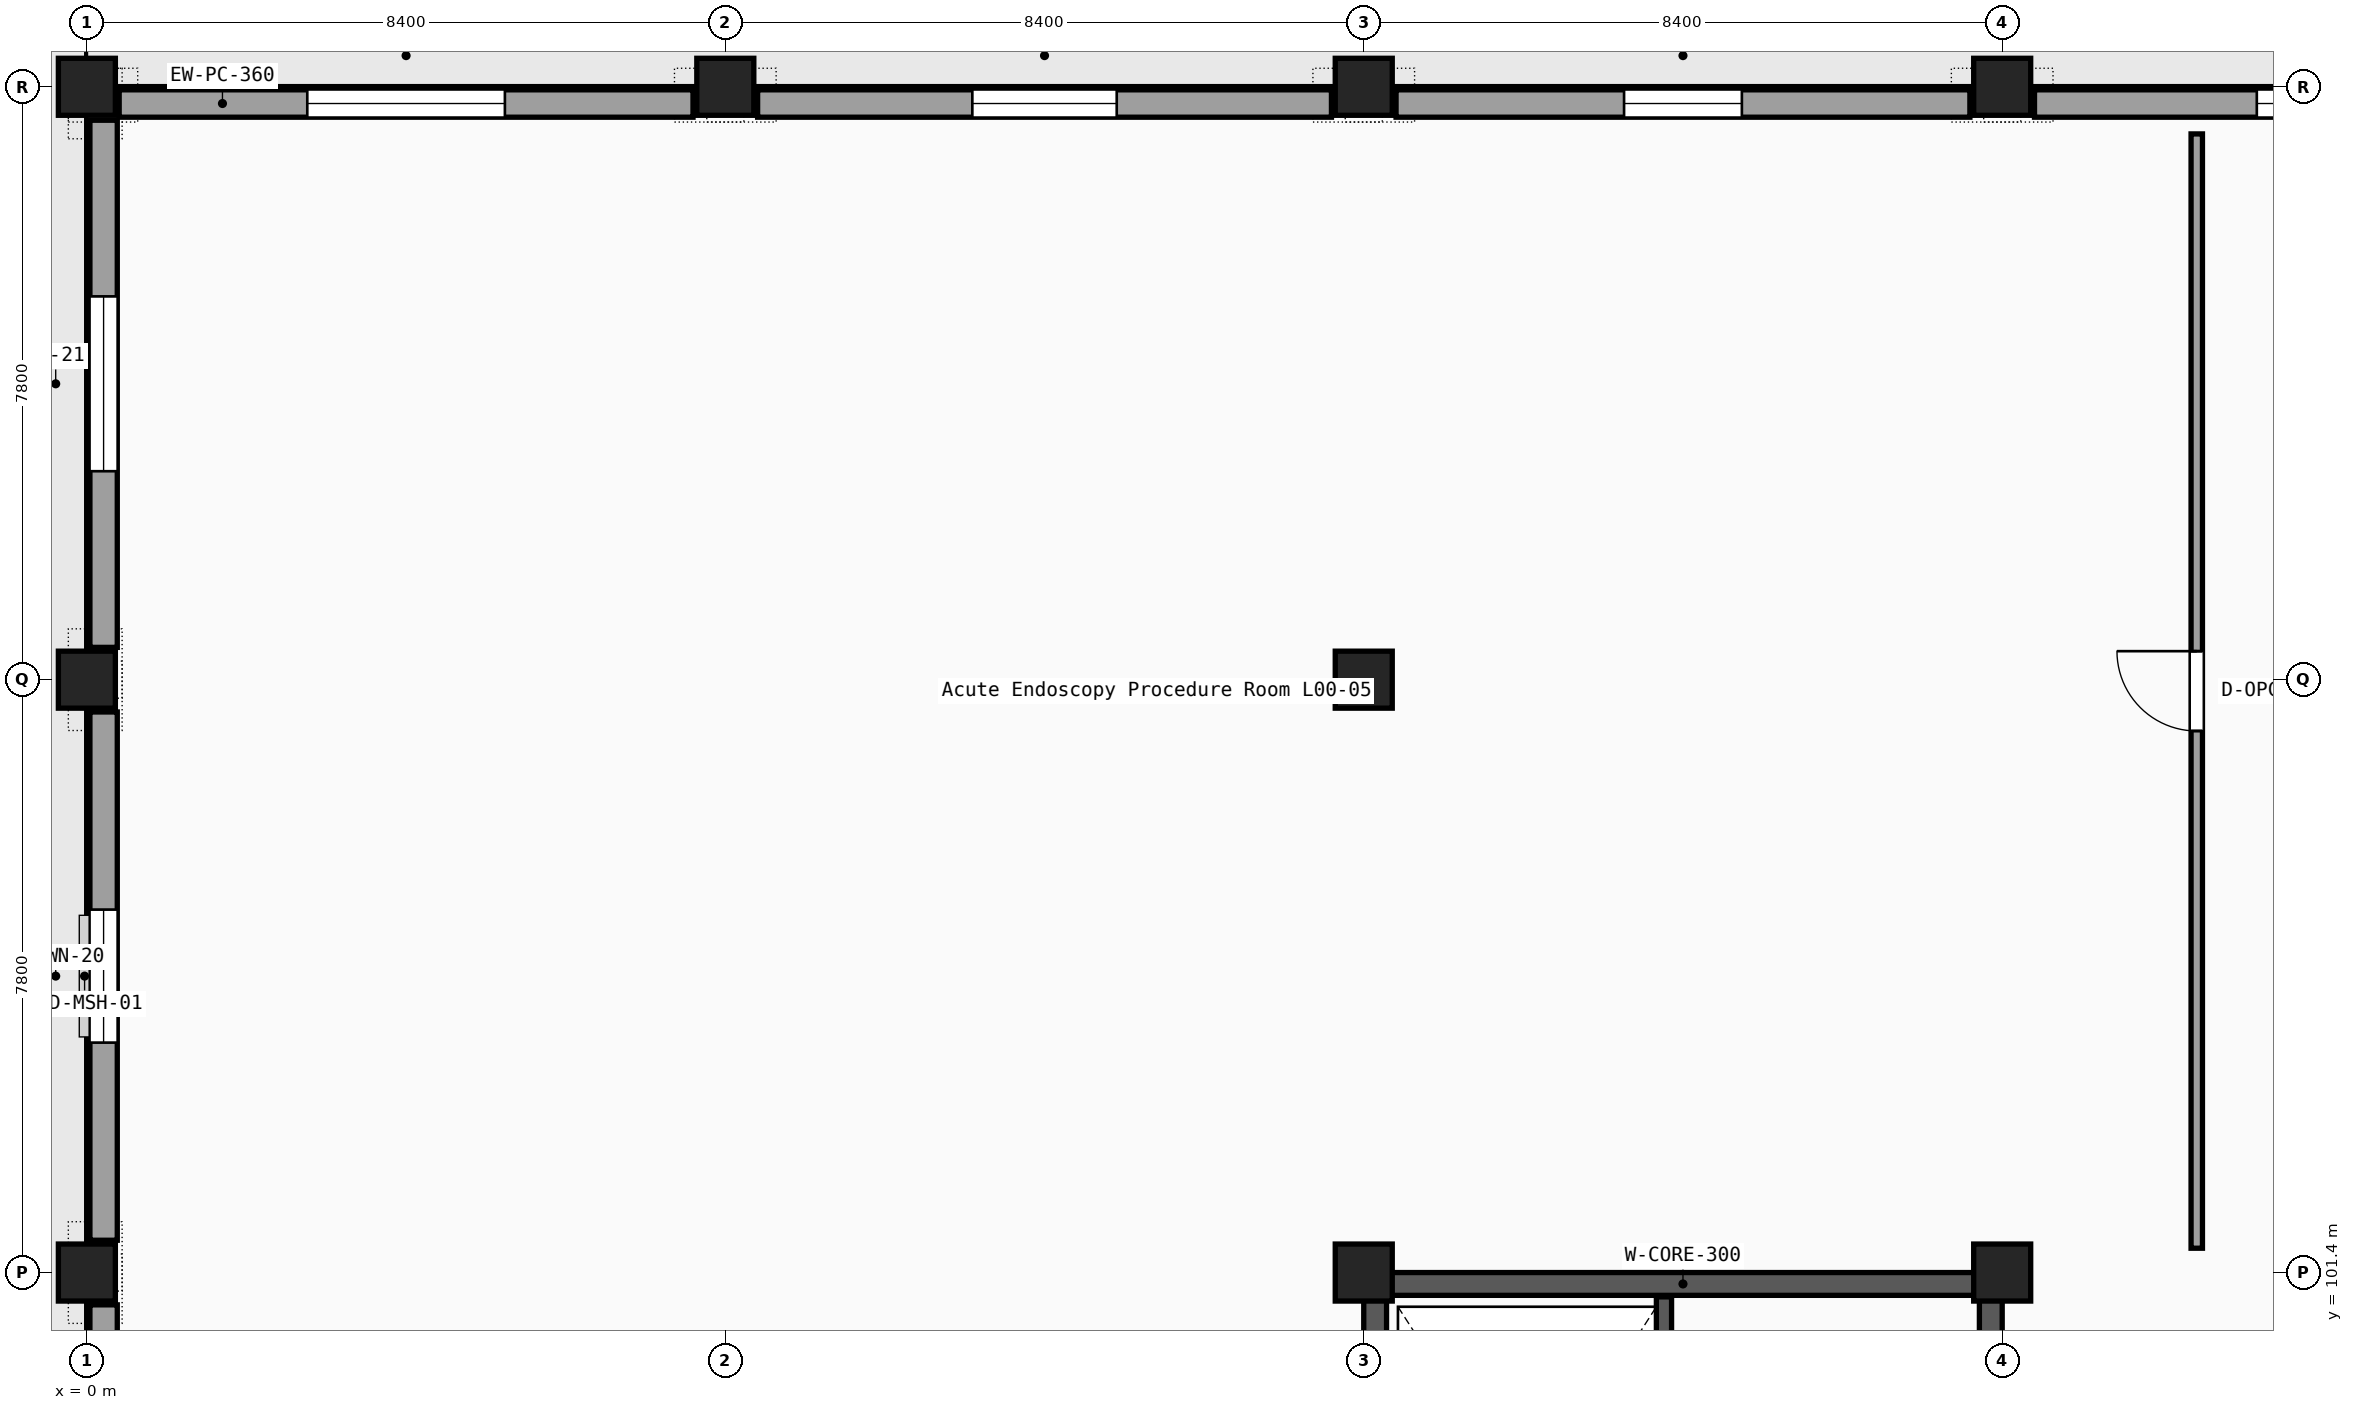
"""IFC4 building model, lengths in metres.
Left out: names, types, materials, properties, quantities, classifications, styles, units other than length and angle.
Written with IfcOpenShell. Run it as: python <this file> out.ifc"""

import sys

from ifc_helpers import new_model, si_unit, direction, frame, frame_2d, origin, origin_2d, place, context, subcontext, project, spatial, rectangle, extrude, element, fill, save


model = new_model("IFC4")
c1 = context("Model", 3, precision=1e-05, world=origin(), true_north=direction((0.0, 1.0)))
c2 = subcontext(c1, "Body", "Model", "MODEL_VIEW")
j1 = project(units=[si_unit("LENGTHUNIT", "METRE"), si_unit("PLANEANGLEUNIT", "RADIAN")], contexts=[c1])
p1 = place(None, origin())
s1 = spatial("IfcSite", under=j1, at=p1, CompositionType="ELEMENT")
p2 = place(p1, origin())
s2 = spatial("IfcBuilding", under=s1, at=p2, CompositionType="ELEMENT")
p3 = place(p2, origin())
s3 = spatial("IfcBuildingStorey", under=s2, at=p3, CompositionType="ELEMENT", Elevation=0.0)
for number, where, z_axis, x_axis in (
    (1, (0.0, 101.4, 0.0), (0.0, 0.0, 1.0), (1.0, 0.0, 0.0)),
    (2, (0.0, 109.2, 0.0), (0.0, 0.0, 1.0), (1.0, 0.0, 0.0)),
    (3, (0.0, 117.0, 0.0), (0.0, 0.0, 1.0), (1.0, 0.0, 0.0)),
    (4, (8.4, 117.0, 0.0), (0.0, 0.0, 1.0), (1.0, 0.0, 0.0)),
    (5, (16.8, 101.4, 0.0), (0.0, 0.0, 1.0), (1.0, 0.0, 0.0)),
    (6, (16.8, 109.2, 0.0), (0.0, 0.0, 1.0), (1.0, 0.0, 0.0)),
    (7, (16.8, 117.0, 0.0), (0.0, 0.0, 1.0), (1.0, 0.0, 0.0)),
    (8, (25.2, 101.4, 0.0), (0.0, 0.0, 1.0), (1.0, 0.0, 0.0)),
    (9, (25.2, 117.0, 0.0), (0.0, 0.0, 1.0), (1.0, 0.0, 0.0)),
):
    element("IfcColumn", number, at=place(p3, frame(where, z_axis=z_axis, x_axis=x_axis)), inside=s3, PredefinedType="COLUMN", context=c2, shape_type="SweptSolid", body=[
        extrude(rectangle(XDim=0.75, YDim=0.75, at=origin_2d()), origin(), (0.0, 0.0, 1.0), 5.1),
    ])
p4 = place(p3, frame((0.22, 94.025, 0.0), z_axis=(0.0, 0.0, 1.0), x_axis=(0.0, 1.0, 0.0)))
e10 = element("IfcWall", 10, at=p4, inside=s3, PredefinedType="SOLIDWALL", context=c2, shape_type="SweptSolid", body=[
    extrude(rectangle(XDim=6.95, YDim=0.36, at=frame_2d((3.475, 0.0))), origin(), (0.0, 0.0, 1.0), 4.26),
])
p5 = place(p4, frame((3.025, 0.0, 0.9)))
e11 = element("IfcOpeningElement", 11, at=p5, cuts=e10, PredefinedType="OPENING", context=c2, shape_type="SweptSolid", body=[
    extrude(rectangle(XDim=0.9, YDim=1.8, at=frame_2d((0.45, 0.9))), frame((0.0, 0.19, 0.0), z_axis=(0.0, -1.0, 0.0), x_axis=(1.0, 0.0, 0.0)), (0.0, 0.0, 1.0), 0.38),
])
p6 = place(p3, frame((0.22, 101.825, 0.0), z_axis=(0.0, 0.0, 1.0), x_axis=(0.0, 1.0, 0.0)))
e12 = element("IfcWall", 12, at=p6, inside=s3, PredefinedType="SOLIDWALL", context=c2, shape_type="SweptSolid", body=[
    extrude(rectangle(XDim=6.95, YDim=0.36, at=frame_2d((3.475, 0.0))), origin(), (0.0, 0.0, 1.0), 4.26),
])
p7 = place(p6, frame((2.6, 0.0, 0.75)))
e13 = element("IfcOpeningElement", 13, at=p7, cuts=e12, PredefinedType="OPENING", context=c2, shape_type="SweptSolid", body=[
    extrude(rectangle(XDim=1.75, YDim=1.9, at=frame_2d((0.875, 0.95))), frame((0.0, 0.19, 0.0), z_axis=(0.0, -1.0, 0.0), x_axis=(1.0, 0.0, 0.0)), (0.0, 0.0, 1.0), 0.38),
])
p8 = place(p3, frame((0.22, 109.625, 0.0), z_axis=(0.0, 0.0, 1.0), x_axis=(0.0, 1.0, 0.0)))
e14 = element("IfcWall", 14, at=p8, inside=s3, PredefinedType="SOLIDWALL", context=c2, shape_type="SweptSolid", body=[
    extrude(rectangle(XDim=6.935, YDim=0.36, at=frame_2d((3.468, 0.0))), origin(), (0.0, 0.0, 1.0), 4.26),
])
p9 = place(p8, frame((2.317, 0.0, 0.95)))
e15 = element("IfcOpeningElement", 15, at=p9, cuts=e14, PredefinedType="OPENING", context=c2, shape_type="SweptSolid", body=[
    extrude(rectangle(XDim=2.3, YDim=1.55, at=frame_2d((1.15, 0.775))), frame((0.0, 0.19, 0.0), z_axis=(0.0, -1.0, 0.0), x_axis=(1.0, 0.0, 0.0)), (0.0, 0.0, 1.0), 0.38),
])
p10 = place(p3, frame((0.425, 116.78, 0.0), z_axis=(0.0, 0.0, 1.0), x_axis=(1.0, 0.0, 0.0)))
e16 = element("IfcWall", 16, at=p10, inside=s3, PredefinedType="SOLIDWALL", context=c2, shape_type="SweptSolid", body=[
    extrude(rectangle(XDim=7.55, YDim=0.36, at=frame_2d((3.775, 0.0))), origin(), (0.0, 0.0, 1.0), 4.42),
])
p11 = place(p10, frame((2.475, 0.0, 0.65)))
e17 = element("IfcOpeningElement", 17, at=p11, cuts=e16, PredefinedType="OPENING", context=c2, shape_type="SweptSolid", body=[
    extrude(rectangle(XDim=2.6, YDim=2.0, at=frame_2d((1.3, 1.0))), frame((0.0, 0.19, 0.0), z_axis=(0.0, -1.0, 0.0), x_axis=(1.0, 0.0, 0.0)), (0.0, 0.0, 1.0), 0.38),
])
p12 = place(p3, frame((8.825, 116.78, 0.0), z_axis=(0.0, 0.0, 1.0), x_axis=(1.0, 0.0, 0.0)))
e18 = element("IfcWall", 18, at=p12, inside=s3, PredefinedType="SOLIDWALL", context=c2, shape_type="SweptSolid", body=[
    extrude(rectangle(XDim=7.55, YDim=0.36, at=frame_2d((3.775, 0.0))), origin(), (0.0, 0.0, 1.0), 4.45),
])
p13 = place(p12, frame((2.825, 0.0, 0.85)))
e19 = element("IfcOpeningElement", 19, at=p13, cuts=e18, PredefinedType="OPENING", context=c2, shape_type="SweptSolid", body=[
    extrude(rectangle(XDim=1.9, YDim=1.65, at=frame_2d((0.95, 0.825))), frame((0.0, 0.19, 0.0), z_axis=(0.0, -1.0, 0.0), x_axis=(1.0, 0.0, 0.0)), (0.0, 0.0, 1.0), 0.38),
])
p14 = place(p3, frame((17.225, 116.78, 0.0), z_axis=(0.0, 0.0, 1.0), x_axis=(1.0, 0.0, 0.0)))
e20 = element("IfcWall", 20, at=p14, inside=s3, PredefinedType="SOLIDWALL", context=c2, shape_type="SweptSolid", body=[
    extrude(rectangle(XDim=7.55, YDim=0.36, at=frame_2d((3.775, 0.0))), origin(), (0.0, 0.0, 1.0), 4.45),
])
p15 = place(p14, frame((3.0, 0.0, 0.8)))
e21 = element("IfcOpeningElement", 21, at=p15, cuts=e20, PredefinedType="OPENING", context=c2, shape_type="SweptSolid", body=[
    extrude(rectangle(XDim=1.55, YDim=1.7, at=frame_2d((0.775, 0.85))), frame((0.0, 0.19, 0.0), z_axis=(0.0, -1.0, 0.0), x_axis=(1.0, 0.0, 0.0)), (0.0, 0.0, 1.0), 0.38),
])
p16 = place(p3, frame((25.625, 116.78, 0.0), z_axis=(0.0, 0.0, 1.0), x_axis=(1.0, 0.0, 0.0)))
e22 = element("IfcWall", 22, at=p16, inside=s3, PredefinedType="SOLIDWALL", context=c2, shape_type="SweptSolid", body=[
    extrude(rectangle(XDim=7.55, YDim=0.36, at=frame_2d((3.775, 0.0))), origin(), (0.0, 0.0, 1.0), 4.45),
])
p17 = place(p16, frame((2.925, 0.0, 0.95)))
e23 = element("IfcOpeningElement", 23, at=p17, cuts=e22, PredefinedType="OPENING", context=c2, shape_type="SweptSolid", body=[
    extrude(rectangle(XDim=1.7, YDim=1.55, at=frame_2d((0.85, 0.775))), frame((0.0, 0.19, 0.0), z_axis=(0.0, -1.0, 0.0), x_axis=(1.0, 0.0, 0.0)), (0.0, 0.0, 1.0), 0.38),
])
p18 = place(p3, frame((16.8, 101.25, 0.0), z_axis=(0.0, 0.0, 1.0), x_axis=(1.0, 0.0, 0.0)))
e24 = element("IfcWall", 24, at=p18, inside=s3, PredefinedType="SHEAR", context=c2, shape_type="SweptSolid", body=[
    extrude(rectangle(XDim=8.4, YDim=0.3, at=frame_2d((4.2, 0.0))), origin(), (0.0, 0.0, 1.0), 4.83),
])
for number, where, z_axis, x_axis in (
    (25, (16.95, 93.9, 0.0), (0.0, 0.0, 1.0), (0.0, 1.0, 0.0)),
    (26, (25.05, 93.9, 0.0), (0.0, 0.0, 1.0), (0.0, 1.0, 0.0)),
):
    element("IfcWall", number, at=place(p3, frame(where, z_axis=z_axis, x_axis=x_axis)), inside=s3, PredefinedType="SHEAR", context=c2, shape_type="SweptSolid", body=[
        extrude(rectangle(XDim=7.2, YDim=0.3, at=frame_2d((3.6, 0.0))), origin(), (0.0, 0.0, 1.0), 4.83),
    ])
p19 = place(p3, frame((20.75, 93.92, 0.0), z_axis=(0.0, 0.0, 1.0), x_axis=(0.0, 1.0, 0.0)))
e27 = element("IfcWall", 27, at=p19, inside=s3, PredefinedType="SHEAR", context=c2, shape_type="SweptSolid", body=[
    extrude(rectangle(XDim=7.16, YDim=0.2, at=frame_2d((3.58, 0.0))), origin(), (0.0, 0.0, 1.0), 4.83),
])
p20 = place(p3, frame((27.76, 101.72, 0.0), z_axis=(0.0, 0.0, 1.0), x_axis=(0.0, 1.0, 0.0)))
e28 = element("IfcWall", 28, at=p20, inside=s3, PredefinedType="PARTITIONING", context=c2, shape_type="SweptSolid", body=[
    extrude(rectangle(XDim=14.66, YDim=0.15, at=frame_2d((7.33, 0.0))), origin(), (0.0, 0.0, 1.0), 4.21),
])
p21 = place(p20, frame((6.805, 0.0, 0.0)))
e29 = element("IfcOpeningElement", 29, at=p21, cuts=e28, PredefinedType="OPENING", context=c2, shape_type="SweptSolid", body=[
    extrude(rectangle(XDim=1.05, YDim=2.15, at=frame_2d((0.525, 1.075))), frame((0.0, 0.085, 0.0), z_axis=(0.0, -1.0, 0.0), x_axis=(1.0, 0.0, 0.0)), (0.0, 0.0, 1.0), 0.17),
])
p22 = place(p7, origin())
e30 = element("IfcWindow", 30, at=p22, inside=s3, PartitioningType="SINGLE_PANEL", PredefinedType="WINDOW", context=c2, shape_type="SweptSolid", body=[
    extrude(rectangle(XDim=1.75, YDim=1.9, at=frame_2d((0.875, 0.95))), frame((0.0, 0.03, 0.0), z_axis=(0.0, -1.0, 0.0), x_axis=(1.0, 0.0, 0.0)), (0.0, 0.0, 1.0), 0.06),
])
fill(e13, e30)
p23 = place(p9, origin())
e31 = element("IfcWindow", 31, at=p23, inside=s3, PartitioningType="SINGLE_PANEL", PredefinedType="WINDOW", context=c2, shape_type="SweptSolid", body=[
    extrude(rectangle(XDim=2.3, YDim=1.55, at=frame_2d((1.15, 0.775))), frame((0.0, 0.03, 0.0), z_axis=(0.0, -1.0, 0.0), x_axis=(1.0, 0.0, 0.0)), (0.0, 0.0, 1.0), 0.06),
])
fill(e15, e31)
p24 = place(p11, origin())
e32 = element("IfcWindow", 32, at=p24, inside=s3, PartitioningType="SINGLE_PANEL", PredefinedType="WINDOW", context=c2, shape_type="SweptSolid", body=[
    extrude(rectangle(XDim=2.6, YDim=2.0, at=frame_2d((1.3, 1.0))), frame((0.0, 0.03, 0.0), z_axis=(0.0, -1.0, 0.0), x_axis=(1.0, 0.0, 0.0)), (0.0, 0.0, 1.0), 0.06),
])
fill(e17, e32)
p25 = place(p13, origin())
e33 = element("IfcWindow", 33, at=p25, inside=s3, PartitioningType="SINGLE_PANEL", PredefinedType="WINDOW", context=c2, shape_type="SweptSolid", body=[
    extrude(rectangle(XDim=1.9, YDim=1.65, at=frame_2d((0.95, 0.825))), frame((0.0, 0.03, 0.0), z_axis=(0.0, -1.0, 0.0), x_axis=(1.0, 0.0, 0.0)), (0.0, 0.0, 1.0), 0.06),
])
fill(e19, e33)
p26 = place(p15, origin())
e34 = element("IfcWindow", 34, at=p26, inside=s3, PartitioningType="SINGLE_PANEL", PredefinedType="WINDOW", context=c2, shape_type="SweptSolid", body=[
    extrude(rectangle(XDim=1.55, YDim=1.7, at=frame_2d((0.775, 0.85))), frame((0.0, 0.03, 0.0), z_axis=(0.0, -1.0, 0.0), x_axis=(1.0, 0.0, 0.0)), (0.0, 0.0, 1.0), 0.06),
])
fill(e21, e34)
p27 = place(p17, origin())
e35 = element("IfcWindow", 35, at=p27, inside=s3, PartitioningType="SINGLE_PANEL", PredefinedType="WINDOW", context=c2, shape_type="SweptSolid", body=[
    extrude(rectangle(XDim=1.7, YDim=1.55, at=frame_2d((0.85, 0.775))), frame((0.0, 0.03, 0.0), z_axis=(0.0, -1.0, 0.0), x_axis=(1.0, 0.0, 0.0)), (0.0, 0.0, 1.0), 0.06),
])
fill(e23, e35)
p28 = place(p21, origin())
e36 = element("IfcDoor", 36, at=p28, inside=s3, OperationType="SINGLE_SWING_RIGHT", PredefinedType="DOOR", context=c2, shape_type="SweptSolid", body=[
    extrude(rectangle(XDim=1.05, YDim=2.15, at=frame_2d((0.525, 1.075))), frame((0.0, 0.025, 0.0), z_axis=(0.0, -1.0, 0.0), x_axis=(1.0, 0.0, 0.0)), (0.0, 0.0, 1.0), 0.05),
])
fill(e29, e36)
save(model, sys.argv[1])
